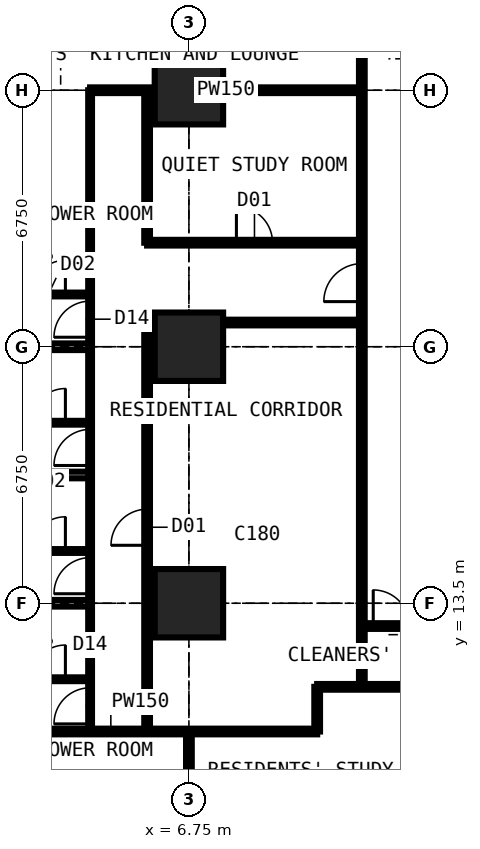
"""IFC4 building model, lengths in metres.
Left out: names, types, materials, properties, quantities, classifications, styles, units other than length and angle.
Written with IfcOpenShell. Run it as: python <this file> out.ifc"""

import sys

from ifc_helpers import new_model, si_unit, direction, frame, frame_2d, origin, origin_2d, place, context, subcontext, project, spatial, rectangle, extrude, element, fill, save


model = new_model("IFC4")
c1 = context("Model", 3, precision=1e-05, world=origin(), true_north=direction((0.0, 1.0)))
c2 = subcontext(c1, "Body", "Model", "MODEL_VIEW")
j1 = project(units=[si_unit("LENGTHUNIT", "METRE"), si_unit("PLANEANGLEUNIT", "RADIAN")], contexts=[c1])
p1 = place(None, origin())
s1 = spatial("IfcSite", under=j1, at=p1, CompositionType="ELEMENT")
p2 = place(p1, origin())
s2 = spatial("IfcBuilding", under=s1, at=p2, CompositionType="ELEMENT")
p3 = place(p2, frame((0.0, 0.0, 98.1)))
s3 = spatial("IfcBuildingStorey", under=s2, at=p3, CompositionType="ELEMENT", Elevation=98.1)
for number, where, z_axis, x_axis in (
    (1, (6.75, 13.5, 0.0), (0.0, 0.0, 1.0), (1.0, 0.0, 0.0)),
    (2, (6.75, 20.25, 0.0), (0.0, 0.0, 1.0), (1.0, 0.0, 0.0)),
    (3, (6.75, 27.0, 0.0), (0.0, 0.0, 1.0), (1.0, 0.0, 0.0)),
):
    element("IfcColumn", number, at=place(p3, frame(where, z_axis=z_axis, x_axis=x_axis)), inside=s3, PredefinedType="COLUMN", context=c2, shape_type="SweptSolid", body=[
        extrude(rectangle(XDim=1.8, YDim=1.8, at=origin_2d()), origin(), (0.0, 0.0, 1.0), 3.6),
    ])
p4 = place(p3, frame((-0.734, 10.125, 0.0), z_axis=(0.0, 0.0, 1.0), x_axis=(1.0, 0.0, 0.0)))
e4 = element("IfcWall", 4, at=p4, inside=s3, PredefinedType="PARTITIONING", context=c2, shape_type="SweptSolid", body=[
    extrude(rectangle(XDim=10.859, YDim=0.15, at=frame_2d((5.429, 0.0))), origin(), (0.0, 0.0, 1.0), 3.375),
])
p5 = place(p3, frame((-0.734, 13.5, 0.0), z_axis=(0.0, 0.0, 1.0), x_axis=(1.0, 0.0, 0.0)))
e5 = element("IfcWall", 5, at=p5, inside=s3, PredefinedType="PARTITIONING", context=c2, shape_type="SweptSolid", body=[
    extrude(rectangle(XDim=4.884, YDim=0.175, at=frame_2d((2.442, 0.0))), origin(), (0.0, 0.0, 1.0), 2.61),
])
p6 = place(p3, frame((-0.734, 16.875, 0.0), z_axis=(0.0, 0.0, 1.0), x_axis=(1.0, 0.0, 0.0)))
e6 = element("IfcWall", 6, at=p6, inside=s3, PredefinedType="PARTITIONING", context=c2, shape_type="SweptSolid", body=[
    extrude(rectangle(XDim=4.884, YDim=0.175, at=frame_2d((2.442, 0.0))), origin(), (0.0, 0.0, 1.0), 3.375),
])
p7 = place(p3, frame((-0.734, 20.25, 0.0), z_axis=(0.0, 0.0, 1.0), x_axis=(1.0, 0.0, 0.0)))
e7 = element("IfcWall", 7, at=p7, inside=s3, PredefinedType="PARTITIONING", context=c2, shape_type="SweptSolid", body=[
    extrude(rectangle(XDim=4.884, YDim=0.175, at=frame_2d((2.442, 0.0))), origin(), (0.0, 0.0, 1.0), 2.61),
])
p8 = place(p3, frame((-0.734, 23.625, 0.0), z_axis=(0.0, 0.0, 1.0), x_axis=(1.0, 0.0, 0.0)))
e8 = element("IfcWall", 8, at=p8, inside=s3, PredefinedType="PARTITIONING", context=c2, shape_type="SweptSolid", body=[
    extrude(rectangle(XDim=4.884, YDim=0.15, at=frame_2d((2.442, 0.0))), origin(), (0.0, 0.0, 1.0), 3.375),
])
p9 = place(p3, frame((1.95, 11.5, 0.0), z_axis=(0.0, 0.0, 1.0), x_axis=(1.0, 0.0, 0.0)))
e9 = element("IfcWall", 9, at=p9, inside=s3, PredefinedType="PARTITIONING", context=c2, shape_type="SweptSolid", body=[
    extrude(rectangle(XDim=2.2, YDim=0.1, at=frame_2d((1.1, 0.0))), origin(), (0.0, 0.0, 1.0), 3.375),
])
p10 = place(p9, frame((0.65, 0.0, 0.0)))
e10 = element("IfcOpeningElement", 10, at=p10, cuts=e9, PredefinedType="OPENING", context=c2, shape_type="SweptSolid", body=[
    extrude(rectangle(XDim=0.9, YDim=2.2, at=frame_2d((0.45, 1.1))), frame((0.0, 0.06, 0.0), z_axis=(0.0, -1.0, 0.0), x_axis=(1.0, 0.0, 0.0)), (0.0, 0.0, 1.0), 0.12),
])
p11 = place(p3, frame((1.95, 14.875, 0.0), z_axis=(0.0, 0.0, 1.0), x_axis=(1.0, 0.0, 0.0)))
e11 = element("IfcWall", 11, at=p11, inside=s3, PredefinedType="PARTITIONING", context=c2, shape_type="SweptSolid", body=[
    extrude(rectangle(XDim=2.2, YDim=0.1, at=frame_2d((1.1, 0.0))), origin(), (0.0, 0.0, 1.0), 3.375),
])
p12 = place(p11, frame((0.65, 0.0, 0.0)))
e12 = element("IfcOpeningElement", 12, at=p12, cuts=e11, PredefinedType="OPENING", context=c2, shape_type="SweptSolid", body=[
    extrude(rectangle(XDim=0.9, YDim=2.2, at=frame_2d((0.45, 1.1))), frame((0.0, 0.06, 0.0), z_axis=(0.0, -1.0, 0.0), x_axis=(1.0, 0.0, 0.0)), (0.0, 0.0, 1.0), 0.12),
])
p13 = place(p3, frame((1.95, 18.25, 0.0), z_axis=(0.0, 0.0, 1.0), x_axis=(1.0, 0.0, 0.0)))
e13 = element("IfcWall", 13, at=p13, inside=s3, PredefinedType="PARTITIONING", context=c2, shape_type="SweptSolid", body=[
    extrude(rectangle(XDim=2.2, YDim=0.1, at=frame_2d((1.1, 0.0))), origin(), (0.0, 0.0, 1.0), 3.375),
])
p14 = place(p13, frame((0.65, 0.0, 0.0)))
e14 = element("IfcOpeningElement", 14, at=p14, cuts=e13, PredefinedType="OPENING", context=c2, shape_type="SweptSolid", body=[
    extrude(rectangle(XDim=0.9, YDim=2.2, at=frame_2d((0.45, 1.1))), frame((0.0, 0.06, 0.0), z_axis=(0.0, -1.0, 0.0), x_axis=(1.0, 0.0, 0.0)), (0.0, 0.0, 1.0), 0.12),
])
p15 = place(p3, frame((1.95, 21.625, 0.0), z_axis=(0.0, 0.0, 1.0), x_axis=(1.0, 0.0, 0.0)))
e15 = element("IfcWall", 15, at=p15, inside=s3, PredefinedType="PARTITIONING", context=c2, shape_type="SweptSolid", body=[
    extrude(rectangle(XDim=2.2, YDim=0.1, at=frame_2d((1.1, 0.0))), origin(), (0.0, 0.0, 1.0), 3.375),
])
p16 = place(p15, frame((0.65, 0.0, 0.0)))
e16 = element("IfcOpeningElement", 16, at=p16, cuts=e15, PredefinedType="OPENING", context=c2, shape_type="SweptSolid", body=[
    extrude(rectangle(XDim=0.9, YDim=2.2, at=frame_2d((0.45, 1.1))), frame((0.0, 0.06, 0.0), z_axis=(0.0, -1.0, 0.0), x_axis=(1.0, 0.0, 0.0)), (0.0, 0.0, 1.0), 0.12),
])
p17 = place(p3, frame((4.15, 10.125, 0.0), z_axis=(0.0, 0.0, 1.0), x_axis=(0.0, 1.0, 0.0)))
e17 = element("IfcWall", 17, at=p17, inside=s3, PredefinedType="PARTITIONING", context=c2, shape_type="SweptSolid", body=[
    extrude(rectangle(XDim=16.875, YDim=0.1, at=frame_2d((8.438, 0.0))), origin(), (0.0, 0.0, 1.0), 3.375),
])
p18 = place(p17, frame((0.2, 0.0, 0.0)))
e18 = element("IfcOpeningElement", 18, at=p18, cuts=e17, PredefinedType="OPENING", context=c2, shape_type="SweptSolid", body=[
    extrude(rectangle(XDim=0.95, YDim=2.2, at=frame_2d((0.475, 1.1))), frame((0.0, 0.06, 0.0), z_axis=(0.0, -1.0, 0.0), x_axis=(1.0, 0.0, 0.0)), (0.0, 0.0, 1.0), 0.12),
])
p19 = place(p17, frame((3.625, 0.0, 0.0)))
e19 = element("IfcOpeningElement", 19, at=p19, cuts=e17, PredefinedType="OPENING", context=c2, shape_type="SweptSolid", body=[
    extrude(rectangle(XDim=0.95, YDim=2.2, at=frame_2d((0.475, 1.1))), frame((0.0, 0.06, 0.0), z_axis=(0.0, -1.0, 0.0), x_axis=(1.0, 0.0, 0.0)), (0.0, 0.0, 1.0), 0.12),
])
p20 = place(p17, frame((7.0, 0.0, 0.0)))
e20 = element("IfcOpeningElement", 20, at=p20, cuts=e17, PredefinedType="OPENING", context=c2, shape_type="SweptSolid", body=[
    extrude(rectangle(XDim=0.95, YDim=2.2, at=frame_2d((0.475, 1.1))), frame((0.0, 0.06, 0.0), z_axis=(0.0, -1.0, 0.0), x_axis=(1.0, 0.0, 0.0)), (0.0, 0.0, 1.0), 0.12),
])
p21 = place(p17, frame((10.375, 0.0, 0.0)))
e21 = element("IfcOpeningElement", 21, at=p21, cuts=e17, PredefinedType="OPENING", context=c2, shape_type="SweptSolid", body=[
    extrude(rectangle(XDim=0.95, YDim=2.2, at=frame_2d((0.475, 1.1))), frame((0.0, 0.06, 0.0), z_axis=(0.0, -1.0, 0.0), x_axis=(1.0, 0.0, 0.0)), (0.0, 0.0, 1.0), 0.12),
])
p22 = place(p3, frame((4.15, 27.0, 0.0), z_axis=(0.0, 0.0, 1.0), x_axis=(1.0, 0.0, 0.0)))
e22 = element("IfcWall", 22, at=p22, inside=s3, PredefinedType="PARTITIONING", context=c2, shape_type="SweptSolid", body=[
    extrude(rectangle(XDim=7.15, YDim=0.15, at=frame_2d((3.575, 0.0))), origin(), (0.0, 0.0, 1.0), 2.806),
])
p23 = place(p3, frame((5.65, 10.125, 0.0), z_axis=(0.0, 0.0, 1.0), x_axis=(0.0, 1.0, 0.0)))
e23 = element("IfcWall", 23, at=p23, inside=s3, PredefinedType="PARTITIONING", context=c2, shape_type="SweptSolid", body=[
    extrude(rectangle(XDim=10.762, YDim=0.15, at=frame_2d((5.381, 0.0))), origin(), (0.0, 0.0, 1.0), 3.375),
])
p24 = place(p23, frame((4.9, 0.0, 0.0)))
e24 = element("IfcOpeningElement", 24, at=p24, cuts=e23, PredefinedType="OPENING", context=c2, shape_type="SweptSolid", body=[
    extrude(rectangle(XDim=0.95, YDim=2.2, at=frame_2d((0.475, 1.1))), frame((0.0, 0.085, 0.0), z_axis=(0.0, -1.0, 0.0), x_axis=(1.0, 0.0, 0.0)), (0.0, 0.0, 1.0), 0.17),
])
p25 = place(p3, frame((5.65, 20.887, 0.0), z_axis=(0.0, 0.0, 1.0), x_axis=(1.0, 0.0, 0.0)))
e25 = element("IfcWall", 25, at=p25, inside=s3, PredefinedType="PARTITIONING", context=c2, shape_type="SweptSolid", body=[
    extrude(rectangle(XDim=5.65, YDim=0.15, at=frame_2d((2.825, 0.0))), origin(), (0.0, 0.0, 1.0), 3.375),
])
p26 = place(p3, frame((5.65, 22.988, 0.0), z_axis=(0.0, 0.0, 1.0), x_axis=(0.0, 1.0, 0.0)))
e26 = element("IfcWall", 26, at=p26, inside=s3, PredefinedType="PARTITIONING", context=c2, shape_type="SweptSolid", body=[
    extrude(rectangle(XDim=4.012, YDim=0.15, at=frame_2d((2.006, 0.0))), origin(), (0.0, 0.0, 1.0), 3.375),
])
p27 = place(p3, frame((5.65, 22.988, 0.0), z_axis=(0.0, 0.0, 1.0), x_axis=(1.0, 0.0, 0.0)))
e27 = element("IfcWall", 27, at=p27, inside=s3, PredefinedType="PARTITIONING", context=c2, shape_type="SweptSolid", body=[
    extrude(rectangle(XDim=5.65, YDim=0.15, at=frame_2d((2.825, 0.0))), origin(), (0.0, 0.0, 1.0), 3.375),
])
p28 = place(p27, frame((2.35, 0.0, 0.0)))
e28 = element("IfcOpeningElement", 28, at=p28, cuts=e27, PredefinedType="OPENING", context=c2, shape_type="SweptSolid", body=[
    extrude(rectangle(XDim=0.95, YDim=2.2, at=frame_2d((0.475, 1.1))), frame((0.0, 0.085, 0.0), z_axis=(0.0, -1.0, 0.0), x_axis=(1.0, 0.0, 0.0)), (0.0, 0.0, 1.0), 0.17),
])
p29 = place(p3, frame((6.75, 4.15, 0.0), z_axis=(0.0, 0.0, 1.0), x_axis=(0.0, 1.0, 0.0)))
e29 = element("IfcWall", 29, at=p29, inside=s3, PredefinedType="PARTITIONING", context=c2, shape_type="SweptSolid", body=[
    extrude(rectangle(XDim=5.975, YDim=0.15, at=frame_2d((2.988, 0.0))), origin(), (0.0, 0.0, 1.0), 2.877),
])
p30 = place(p3, frame((10.125, 10.125, 0.0), z_axis=(0.0, 0.0, 1.0), x_axis=(0.0, 1.0, 0.0)))
e30 = element("IfcWall", 30, at=p30, inside=s3, PredefinedType="PARTITIONING", context=c2, shape_type="SweptSolid", body=[
    extrude(rectangle(XDim=1.175, YDim=0.15, at=frame_2d((0.587, 0.0))), origin(), (0.0, 0.0, 1.0), 3.375),
])
p31 = place(p3, frame((10.125, 11.3, 0.0), z_axis=(0.0, 0.0, 1.0), x_axis=(1.0, 0.0, 0.0)))
e31 = element("IfcWall", 31, at=p31, inside=s3, PredefinedType="PARTITIONING", context=c2, shape_type="SweptSolid", body=[
    extrude(rectangle(XDim=20.675, YDim=0.15, at=frame_2d((10.337, 0.0))), origin(), (0.0, 0.0, 1.0), 3.375),
])
p32 = place(p31, frame((5.2, 0.0, 0.0)))
e32 = element("IfcOpeningElement", 32, at=p32, cuts=e31, PredefinedType="OPENING", context=c2, shape_type="SweptSolid", body=[
    extrude(rectangle(XDim=1.0, YDim=2.2, at=frame_2d((0.5, 1.1))), frame((0.0, 0.085, 0.0), z_axis=(0.0, -1.0, 0.0), x_axis=(1.0, 0.0, 0.0)), (0.0, 0.0, 1.0), 0.17),
])
p33 = place(p31, frame((11.312, 0.0, 0.0)))
e33 = element("IfcOpeningElement", 33, at=p33, cuts=e31, PredefinedType="OPENING", context=c2, shape_type="SweptSolid", body=[
    extrude(rectangle(XDim=1.0, YDim=2.2, at=frame_2d((0.5, 1.1))), frame((0.0, 0.085, 0.0), z_axis=(0.0, -1.0, 0.0), x_axis=(1.0, 0.0, 0.0)), (0.0, 0.0, 1.0), 0.17),
])
p34 = place(p31, frame((3.225, 0.0, 0.0)))
e34 = element("IfcOpeningElement", 34, at=p34, cuts=e31, PredefinedType="OPENING", context=c2, shape_type="SweptSolid", body=[
    extrude(rectangle(XDim=0.95, YDim=2.2, at=frame_2d((0.475, 1.1))), frame((0.0, 0.085, 0.0), z_axis=(0.0, -1.0, 0.0), x_axis=(1.0, 0.0, 0.0)), (0.0, 0.0, 1.0), 0.17),
])
p35 = place(p3, frame((11.3, 11.3, 0.0), z_axis=(0.0, 0.0, 1.0), x_axis=(0.0, 1.0, 0.0)))
e35 = element("IfcWall", 35, at=p35, inside=s3, PredefinedType="PARTITIONING", context=c2, shape_type="SweptSolid", body=[
    extrude(rectangle(XDim=19.3, YDim=0.15, at=frame_2d((9.65, 0.0))), origin(), (0.0, 0.0, 1.0), 3.375),
])
p36 = place(p35, frame((18.1, 0.0, 0.0)))
e36 = element("IfcOpeningElement", 36, at=p36, cuts=e35, PredefinedType="OPENING", context=c2, shape_type="SweptSolid", body=[
    extrude(rectangle(XDim=1.0, YDim=2.2, at=frame_2d((0.5, 1.1))), frame((0.0, 0.085, 0.0), z_axis=(0.0, -1.0, 0.0), x_axis=(1.0, 0.0, 0.0)), (0.0, 0.0, 1.0), 0.17),
])
p37 = place(p35, frame((10.137, 0.0, 0.0)))
e37 = element("IfcOpeningElement", 37, at=p37, cuts=e35, PredefinedType="OPENING", context=c2, shape_type="SweptSolid", body=[
    extrude(rectangle(XDim=1.0, YDim=2.2, at=frame_2d((0.5, 1.1))), frame((0.0, 0.085, 0.0), z_axis=(0.0, -1.0, 0.0), x_axis=(1.0, 0.0, 0.0)), (0.0, 0.0, 1.0), 0.17),
])
p38 = place(p3, frame((11.3, 12.9, 0.0), z_axis=(0.0, 0.0, 1.0), x_axis=(1.0, 0.0, 0.0)))
e38 = element("IfcWall", 38, at=p38, inside=s3, PredefinedType="PARTITIONING", context=c2, shape_type="SweptSolid", body=[
    extrude(rectangle(XDim=1.6, YDim=0.15, at=frame_2d((0.8, 0.0))), origin(), (0.0, 0.0, 1.0), 2.806),
])
p39 = place(p38, frame((0.3, 0.0, 0.0)))
e39 = element("IfcOpeningElement", 39, at=p39, cuts=e38, PredefinedType="OPENING", context=c2, shape_type="SweptSolid", body=[
    extrude(rectangle(XDim=0.95, YDim=2.2, at=frame_2d((0.475, 1.1))), frame((0.0, 0.085, 0.0), z_axis=(0.0, -1.0, 0.0), x_axis=(1.0, 0.0, 0.0)), (0.0, 0.0, 1.0), 0.17),
])
p40 = place(p39, origin())
e40 = element("IfcDoor", 40, at=p40, inside=s3, OperationType="SINGLE_SWING_LEFT", PredefinedType="DOOR", context=c2, shape_type="SweptSolid", body=[
    extrude(rectangle(XDim=0.95, YDim=2.2, at=frame_2d((0.475, 1.1))), frame((0.0, 0.025, 0.0), z_axis=(0.0, -1.0, 0.0), x_axis=(1.0, 0.0, 0.0)), (0.0, 0.0, 1.0), 0.05),
])
fill(e39, e40)
p41 = place(p18, origin())
e41 = element("IfcDoor", 41, at=p41, inside=s3, OperationType="SINGLE_SWING_LEFT", PredefinedType="DOOR", context=c2, shape_type="SweptSolid", body=[
    extrude(rectangle(XDim=0.95, YDim=2.2, at=frame_2d((0.475, 1.1))), frame((0.0, 0.025, 0.0), z_axis=(0.0, -1.0, 0.0), x_axis=(1.0, 0.0, 0.0)), (0.0, 0.0, 1.0), 0.05),
])
fill(e18, e41)
p42 = place(p10, origin())
e42 = element("IfcDoor", 42, at=p42, inside=s3, OperationType="SINGLE_SWING_RIGHT", PredefinedType="DOOR", context=c2, shape_type="SweptSolid", body=[
    extrude(rectangle(XDim=0.9, YDim=2.2, at=frame_2d((0.45, 1.1))), frame((0.0, 0.025, 0.0), z_axis=(0.0, -1.0, 0.0), x_axis=(1.0, 0.0, 0.0)), (0.0, 0.0, 1.0), 0.05),
])
fill(e10, e42)
p43 = place(p19, origin())
e43 = element("IfcDoor", 43, at=p43, inside=s3, OperationType="SINGLE_SWING_LEFT", PredefinedType="DOOR", context=c2, shape_type="SweptSolid", body=[
    extrude(rectangle(XDim=0.95, YDim=2.2, at=frame_2d((0.475, 1.1))), frame((0.0, 0.025, 0.0), z_axis=(0.0, -1.0, 0.0), x_axis=(1.0, 0.0, 0.0)), (0.0, 0.0, 1.0), 0.05),
])
fill(e19, e43)
p44 = place(p12, origin())
e44 = element("IfcDoor", 44, at=p44, inside=s3, OperationType="SINGLE_SWING_RIGHT", PredefinedType="DOOR", context=c2, shape_type="SweptSolid", body=[
    extrude(rectangle(XDim=0.9, YDim=2.2, at=frame_2d((0.45, 1.1))), frame((0.0, 0.025, 0.0), z_axis=(0.0, -1.0, 0.0), x_axis=(1.0, 0.0, 0.0)), (0.0, 0.0, 1.0), 0.05),
])
fill(e12, e44)
p45 = place(p20, origin())
e45 = element("IfcDoor", 45, at=p45, inside=s3, OperationType="SINGLE_SWING_LEFT", PredefinedType="DOOR", context=c2, shape_type="SweptSolid", body=[
    extrude(rectangle(XDim=0.95, YDim=2.2, at=frame_2d((0.475, 1.1))), frame((0.0, 0.025, 0.0), z_axis=(0.0, -1.0, 0.0), x_axis=(1.0, 0.0, 0.0)), (0.0, 0.0, 1.0), 0.05),
])
fill(e20, e45)
p46 = place(p14, origin())
e46 = element("IfcDoor", 46, at=p46, inside=s3, OperationType="SINGLE_SWING_RIGHT", PredefinedType="DOOR", context=c2, shape_type="SweptSolid", body=[
    extrude(rectangle(XDim=0.9, YDim=2.2, at=frame_2d((0.45, 1.1))), frame((0.0, 0.025, 0.0), z_axis=(0.0, -1.0, 0.0), x_axis=(1.0, 0.0, 0.0)), (0.0, 0.0, 1.0), 0.05),
])
fill(e14, e46)
p47 = place(p21, origin())
e47 = element("IfcDoor", 47, at=p47, inside=s3, OperationType="SINGLE_SWING_LEFT", PredefinedType="DOOR", context=c2, shape_type="SweptSolid", body=[
    extrude(rectangle(XDim=0.95, YDim=2.2, at=frame_2d((0.475, 1.1))), frame((0.0, 0.025, 0.0), z_axis=(0.0, -1.0, 0.0), x_axis=(1.0, 0.0, 0.0)), (0.0, 0.0, 1.0), 0.05),
])
fill(e21, e47)
p48 = place(p16, origin())
e48 = element("IfcDoor", 48, at=p48, inside=s3, OperationType="SINGLE_SWING_RIGHT", PredefinedType="DOOR", context=c2, shape_type="SweptSolid", body=[
    extrude(rectangle(XDim=0.9, YDim=2.2, at=frame_2d((0.45, 1.1))), frame((0.0, 0.025, 0.0), z_axis=(0.0, -1.0, 0.0), x_axis=(1.0, 0.0, 0.0)), (0.0, 0.0, 1.0), 0.05),
])
fill(e16, e48)
p49 = place(p37, origin())
e49 = element("IfcDoor", 49, at=p49, inside=s3, OperationType="SINGLE_SWING_LEFT", PredefinedType="DOOR", context=c2, shape_type="SweptSolid", body=[
    extrude(rectangle(XDim=1.0, YDim=2.2, at=frame_2d((0.5, 1.1))), frame((0.0, 0.025, 0.0), z_axis=(0.0, -1.0, 0.0), x_axis=(1.0, 0.0, 0.0)), (0.0, 0.0, 1.0), 0.05),
])
fill(e37, e49)
p50 = place(p24, origin())
e50 = element("IfcDoor", 50, at=p50, inside=s3, OperationType="SINGLE_SWING_LEFT", PredefinedType="DOOR", context=c2, shape_type="SweptSolid", body=[
    extrude(rectangle(XDim=0.95, YDim=2.2, at=frame_2d((0.475, 1.1))), frame((0.0, 0.025, 0.0), z_axis=(0.0, -1.0, 0.0), x_axis=(1.0, 0.0, 0.0)), (0.0, 0.0, 1.0), 0.05),
])
fill(e24, e50)
p51 = place(p28, origin())
e51 = element("IfcDoor", 51, at=p51, inside=s3, OperationType="SINGLE_SWING_LEFT", PredefinedType="DOOR", context=c2, shape_type="SweptSolid", body=[
    extrude(rectangle(XDim=0.95, YDim=2.2, at=frame_2d((0.475, 1.1))), frame((0.0, 0.025, 0.0), z_axis=(0.0, -1.0, 0.0), x_axis=(1.0, 0.0, 0.0)), (0.0, 0.0, 1.0), 0.05),
])
fill(e28, e51)
save(model, sys.argv[1])
